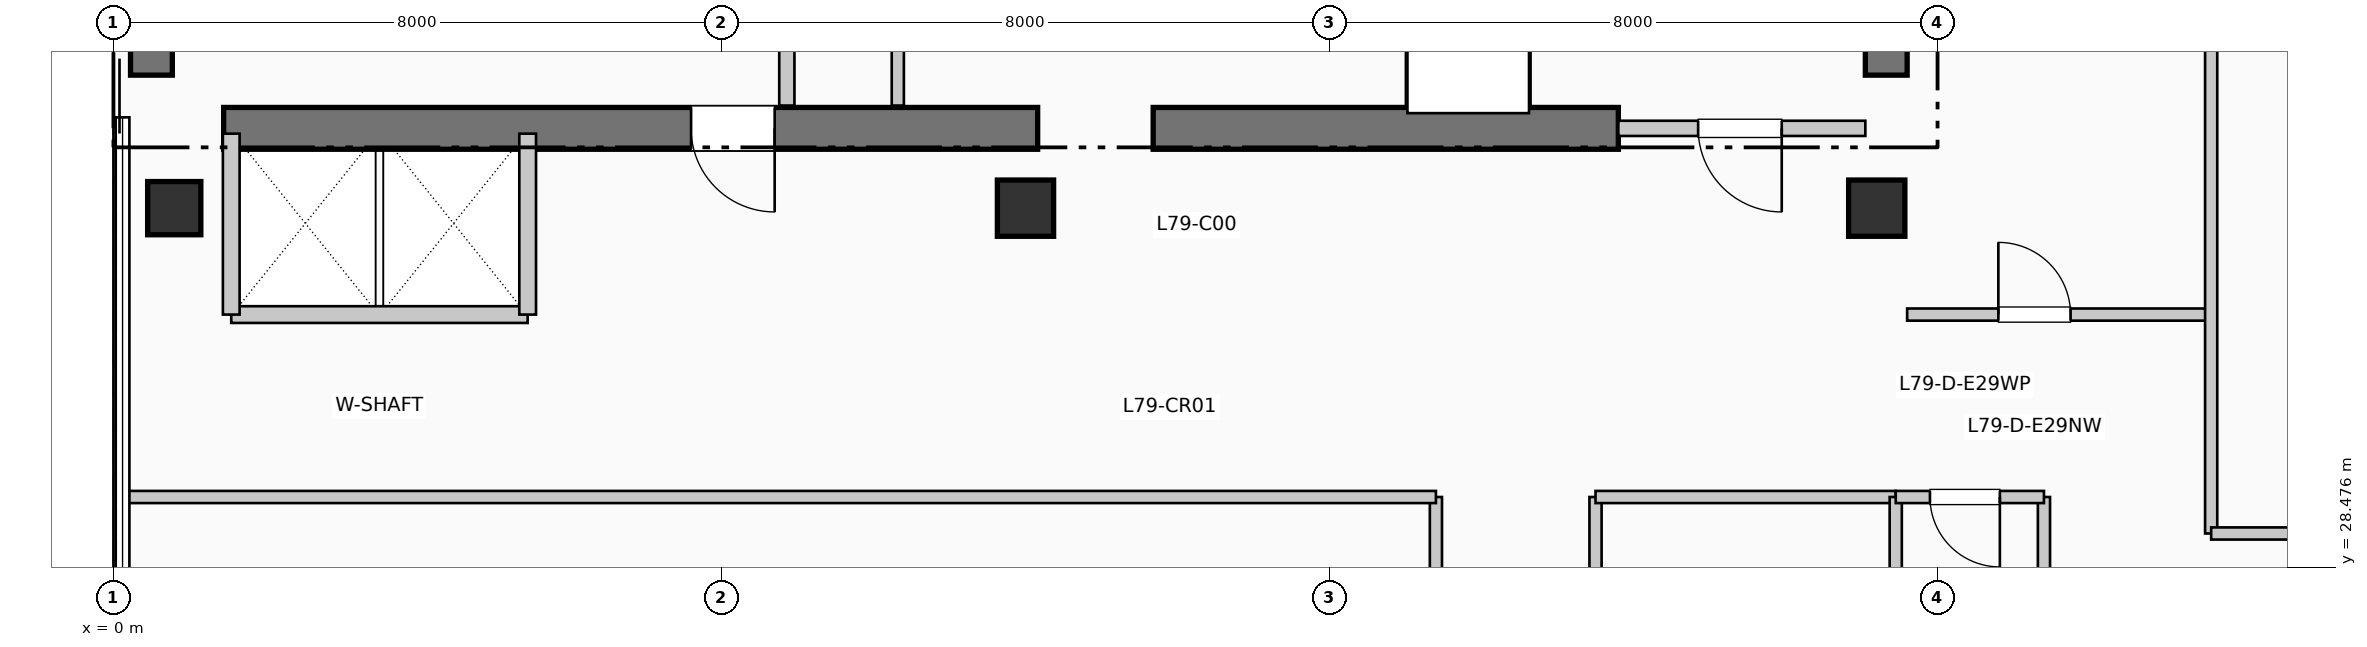
"""IFC4 building model, lengths in metres.
Left out: names, types, materials, properties, quantities, classifications, styles, units other than length and angle.
Written with IfcOpenShell. Run it as: python <this file> out.ifc"""

import sys

from ifc_helpers import new_model, si_unit, direction, frame, frame_2d, origin, origin_2d, place, context, subcontext, project, spatial, rectangle, extrude, element, fill, save


model = new_model("IFC4")
c1 = context("Model", 3, precision=1e-05, world=origin(), true_north=direction((0.0, 1.0)))
c2 = subcontext(c1, "Body", "Model", "MODEL_VIEW")
j1 = project(units=[si_unit("LENGTHUNIT", "METRE"), si_unit("PLANEANGLEUNIT", "RADIAN")], contexts=[c1])
p1 = place(None, origin())
s1 = spatial("IfcSite", under=j1, at=p1, CompositionType="ELEMENT")
p2 = place(p1, origin())
s2 = spatial("IfcBuilding", under=s1, at=p2, CompositionType="ELEMENT")
p3 = place(p2, frame((0.0, 0.0, 323.73)))
s3 = spatial("IfcBuildingStorey", under=s2, at=p3, CompositionType="ELEMENT", Elevation=323.73)
p4 = place(p3, frame((0.5, 34.95, 0.0), z_axis=(0.0, 0.0, 1.0), x_axis=(0.0, 1.0, 0.0)))
e1 = element("IfcWall", 1, at=p4, inside=s3, PredefinedType="SHEAR", context=c2, shape_type="SweptSolid", body=[
    extrude(rectangle(XDim=7.9, YDim=0.55, at=frame_2d((3.95, 0.0))), origin(), (0.0, 0.0, 1.0), 3.96),
])
p5 = place(p3, frame((23.325, 34.95, 0.0), z_axis=(0.0, 0.0, 1.0), x_axis=(0.0, 1.0, 0.0)))
e2 = element("IfcWall", 2, at=p5, inside=s3, PredefinedType="SHEAR", context=c2, shape_type="SweptSolid", body=[
    extrude(rectangle(XDim=10.64, YDim=0.55, at=frame_2d((5.32, 0.0))), origin(), (0.0, 0.0, 1.0), 3.96),
])
p6 = place(p3, frame((1.45, 34.25, 0.0), z_axis=(0.0, 0.0, 1.0), x_axis=(1.0, 0.0, 0.0)))
e3 = element("IfcWall", 3, at=p6, inside=s3, PredefinedType="SHEAR", context=c2, shape_type="SweptSolid", body=[
    extrude(rectangle(XDim=10.71, YDim=0.55, at=frame_2d((5.355, 0.0))), origin(), (0.0, 0.0, 1.0), 3.96),
])
p7 = place(p6, frame((7.25, 0.0, 0.0), z_axis=(0.0, 0.0, 1.0), x_axis=(-1.0, 0.0, 0.0)))
e4 = element("IfcOpeningElement", 4, at=p7, cuts=e3, PredefinedType="OPENING", context=c2, shape_type="SweptSolid", body=[
    extrude(rectangle(XDim=1.1, YDim=2.15, at=frame_2d((0.55, 1.075))), frame((0.0, 0.285, 0.0), z_axis=(0.0, -1.0, 0.0), x_axis=(1.0, 0.0, 0.0)), (0.0, 0.0, 1.0), 0.57),
])
p8 = place(p3, frame((13.68, 34.25, 0.0), z_axis=(0.0, 0.0, 1.0), x_axis=(1.0, 0.0, 0.0)))
e5 = element("IfcWall", 5, at=p8, inside=s3, PredefinedType="SHEAR", context=c2, shape_type="SweptSolid", body=[
    extrude(rectangle(XDim=6.12, YDim=0.55, at=frame_2d((3.06, 0.0))), origin(), (0.0, 0.0, 1.0), 3.96),
])
p9 = place(p3, frame((0.8, 33.2, 0.0), z_axis=(0.0, 0.0, 1.0), x_axis=(1.0, 0.0, 0.0)))
e6 = element("IfcColumn", 6, at=p9, inside=s3, PredefinedType="COLUMN", context=c2, shape_type="SweptSolid", body=[
    extrude(rectangle(XDim=0.7, YDim=0.7, at=origin_2d()), origin(), (0.0, 0.0, 1.0), 3.96),
])
for number, where, z_axis, x_axis in (
    (7, (12.0, 33.2, 0.0), (0.0, 0.0, 1.0), (1.0, 0.0, 0.0)),
    (8, (23.2, 33.2, 0.0), (0.0, 0.0, 1.0), (1.0, 0.0, 0.0)),
):
    element("IfcColumn", number, at=place(p3, frame(where, z_axis=z_axis, x_axis=x_axis)), inside=s3, PredefinedType="COLUMN", context=c2, shape_type="SweptSolid", body=[
        extrude(rectangle(XDim=0.74, YDim=0.74, at=origin_2d()), origin(), (0.0, 0.0, 1.0), 3.96),
    ])
p10 = place(p3, frame((8.86, 34.55, 0.0), z_axis=(0.0, 0.0, 1.0), x_axis=(0.0, 1.0, 0.0)))
e9 = element("IfcWall", 9, at=p10, inside=s3, PredefinedType="PARTITIONING", context=c2, shape_type="SweptSolid", body=[
    extrude(rectangle(XDim=2.5, YDim=0.2, at=frame_2d((1.25, 0.0))), origin(), (0.0, 0.0, 1.0), 3.74),
])
p11 = place(p3, frame((19.8, 34.25, 0.0), z_axis=(0.0, 0.0, 1.0), x_axis=(1.0, 0.0, 0.0)))
e10 = element("IfcWall", 10, at=p11, inside=s3, PredefinedType="PARTITIONING", context=c2, shape_type="SweptSolid", body=[
    extrude(rectangle(XDim=3.25, YDim=0.2, at=frame_2d((1.625, 0.0))), origin(), (0.0, 0.0, 1.0), 3.74),
])
p12 = place(p11, frame((2.15, 0.0, 0.0), z_axis=(0.0, 0.0, 1.0), x_axis=(-1.0, 0.0, 0.0)))
e11 = element("IfcOpeningElement", 11, at=p12, cuts=e10, PredefinedType="OPENING", context=c2, shape_type="SweptSolid", body=[
    extrude(rectangle(XDim=1.1, YDim=2.15, at=frame_2d((0.55, 1.075))), frame((0.0, 0.11, 0.0), z_axis=(0.0, -1.0, 0.0), x_axis=(1.0, 0.0, 0.0)), (0.0, 0.0, 1.0), 0.22),
])
p13 = place(p3, frame((1.55, 31.8, 0.0), z_axis=(0.0, 0.0, 1.0), x_axis=(1.0, 0.0, 0.0)))
e12 = element("IfcWall", 12, at=p13, inside=s3, PredefinedType="PARTITIONING", context=c2, shape_type="SweptSolid", body=[
    extrude(rectangle(XDim=3.9, YDim=0.22, at=frame_2d((1.95, 0.0))), origin(), (0.0, 0.0, 1.0), 3.74),
])
for number, where, z_axis, x_axis in (
    (13, (1.55, 31.8, 0.0), (0.0, 0.0, 1.0), (0.0, 1.0, 0.0)),
    (14, (5.45, 31.8, 0.0), (0.0, 0.0, 1.0), (0.0, 1.0, 0.0)),
):
    element("IfcWall", number, at=place(p3, frame(where, z_axis=z_axis, x_axis=x_axis)), inside=s3, PredefinedType="PARTITIONING", context=c2, shape_type="SweptSolid", body=[
        extrude(rectangle(XDim=2.38, YDim=0.22, at=frame_2d((1.19, 0.0))), origin(), (0.0, 0.0, 1.0), 3.74),
    ])
p14 = place(p3, frame((10.32, 34.55, 0.0), z_axis=(0.0, 0.0, 1.0), x_axis=(0.0, 1.0, 0.0)))
e15 = element("IfcWall", 15, at=p14, inside=s3, PredefinedType="PARTITIONING", context=c2, shape_type="SweptSolid", body=[
    extrude(rectangle(XDim=2.15, YDim=0.16, at=frame_2d((1.075, 0.0))), origin(), (0.0, 0.0, 1.0), 3.74),
])
p15 = place(p3, frame((17.4, 21.0, 0.0), z_axis=(0.0, 0.0, 1.0), x_axis=(0.0, 1.0, 0.0)))
e16 = element("IfcWall", 16, at=p15, inside=s3, PredefinedType="PARTITIONING", context=c2, shape_type="SweptSolid", body=[
    extrude(rectangle(XDim=8.4, YDim=0.16, at=frame_2d((4.2, 0.0))), origin(), (0.0, 0.0, 1.0), 3.74),
])
p16 = place(p15, frame((1.903, 0.0, 0.0), z_axis=(0.0, 0.0, 1.0), x_axis=(-1.0, 0.0, 0.0)))
e17 = element("IfcOpeningElement", 17, at=p16, cuts=e16, PredefinedType="OPENING", context=c2, shape_type="SweptSolid", body=[
    extrude(rectangle(XDim=0.95, YDim=2.15, at=frame_2d((0.475, 1.075))), frame((0.0, 0.09, 0.0), z_axis=(0.0, -1.0, 0.0), x_axis=(1.0, 0.0, 0.0)), (0.0, 0.0, 1.0), 0.18),
])
p17 = place(p15, frame((6.103, 0.0, 0.0), z_axis=(0.0, 0.0, 1.0), x_axis=(-1.0, 0.0, 0.0)))
e18 = element("IfcOpeningElement", 18, at=p17, cuts=e16, PredefinedType="OPENING", context=c2, shape_type="SweptSolid", body=[
    extrude(rectangle(XDim=0.95, YDim=2.15, at=frame_2d((0.475, 1.075))), frame((0.0, 0.09, 0.0), z_axis=(0.0, -1.0, 0.0), x_axis=(1.0, 0.0, 0.0)), (0.0, 0.0, 1.0), 0.18),
])
p18 = place(p3, frame((19.5, 21.0, 0.0), z_axis=(0.0, 0.0, 1.0), x_axis=(0.0, 1.0, 0.0)))
e19 = element("IfcWall", 19, at=p18, inside=s3, PredefinedType="PARTITIONING", context=c2, shape_type="SweptSolid", body=[
    extrude(rectangle(XDim=8.4, YDim=0.16, at=frame_2d((4.2, 0.0))), origin(), (0.0, 0.0, 1.0), 3.74),
])
p19 = place(p18, frame((3.725, 0.0, 0.0)))
e20 = element("IfcOpeningElement", 20, at=p19, cuts=e19, PredefinedType="OPENING", context=c2, shape_type="SweptSolid", body=[
    extrude(rectangle(XDim=0.95, YDim=2.15, at=frame_2d((0.475, 1.075))), frame((0.0, 0.09, 0.0), z_axis=(0.0, -1.0, 0.0), x_axis=(1.0, 0.0, 0.0)), (0.0, 0.0, 1.0), 0.18),
])
p20 = place(p3, frame((0.19, 29.4, 0.0), z_axis=(0.0, 0.0, 1.0), x_axis=(1.0, 0.0, 0.0)))
e21 = element("IfcWall", 21, at=p20, inside=s3, PredefinedType="PARTITIONING", context=c2, shape_type="SweptSolid", body=[
    extrude(rectangle(XDim=17.21, YDim=0.16, at=frame_2d((8.605, 0.0))), origin(), (0.0, 0.0, 1.0), 3.425),
])
p21 = place(p3, frame((19.5, 29.4, 0.0), z_axis=(0.0, 0.0, 1.0), x_axis=(1.0, 0.0, 0.0)))
e22 = element("IfcWall", 22, at=p21, inside=s3, PredefinedType="PARTITIONING", context=c2, shape_type="SweptSolid", body=[
    extrude(rectangle(XDim=3.95, YDim=0.16, at=frame_2d((1.975, 0.0))), origin(), (0.0, 0.0, 1.0), 3.425),
])
p22 = place(p3, frame((23.45, 5.99, 0.0), z_axis=(0.0, 0.0, 1.0), x_axis=(0.0, 1.0, 0.0)))
e23 = element("IfcWall", 23, at=p22, inside=s3, PredefinedType="PARTITIONING", context=c2, shape_type="SweptSolid", body=[
    extrude(rectangle(XDim=23.41, YDim=0.16, at=frame_2d((11.705, 0.0))), origin(), (0.0, 0.0, 1.0), 3.175),
])
p23 = place(p3, frame((25.4, 25.19, 0.0), z_axis=(0.0, 0.0, 1.0), x_axis=(0.0, 1.0, 0.0)))
e24 = element("IfcWall", 24, at=p23, inside=s3, PredefinedType="PARTITIONING", context=c2, shape_type="SweptSolid", body=[
    extrude(rectangle(XDim=4.21, YDim=0.16, at=frame_2d((2.105, 0.0))), origin(), (0.0, 0.0, 1.0), 3.74),
])
p24 = place(p3, frame((23.6, 31.8, 0.0), z_axis=(0.0, 0.0, 1.0), x_axis=(1.0, 0.0, 0.0)))
e25 = element("IfcWall", 25, at=p24, inside=s3, PredefinedType="PARTITIONING", context=c2, shape_type="SweptSolid", body=[
    extrude(rectangle(XDim=4.0, YDim=0.16, at=frame_2d((2.0, 0.0))), origin(), (0.0, 0.0, 1.0), 3.74),
])
p25 = place(p24, frame((1.2, 0.0, 0.0)))
e26 = element("IfcOpeningElement", 26, at=p25, cuts=e25, PredefinedType="OPENING", context=c2, shape_type="SweptSolid", body=[
    extrude(rectangle(XDim=0.95, YDim=2.15, at=frame_2d((0.475, 1.075))), frame((0.0, 0.09, 0.0), z_axis=(0.0, -1.0, 0.0), x_axis=(1.0, 0.0, 0.0)), (0.0, 0.0, 1.0), 0.18),
])
p26 = place(p3, frame((27.6, 28.92, 0.0), z_axis=(0.0, 0.0, 1.0), x_axis=(0.0, 1.0, 0.0)))
e27 = element("IfcWall", 27, at=p26, inside=s3, PredefinedType="PARTITIONING", context=c2, shape_type="SweptSolid", body=[
    extrude(rectangle(XDim=16.89, YDim=0.16, at=frame_2d((8.445, 0.0))), origin(), (0.0, 0.0, 1.0), 3.74),
])
p27 = place(p3, frame((27.6, 28.92, 0.0), z_axis=(0.0, 0.0, 1.0), x_axis=(1.0, 0.0, 0.0)))
e28 = element("IfcWall", 28, at=p27, inside=s3, PredefinedType="PARTITIONING", context=c2, shape_type="SweptSolid", body=[
    extrude(rectangle(XDim=16.61, YDim=0.16, at=frame_2d((8.305, 0.0))), origin(), (0.0, 0.0, 1.0), 3.74),
])
p28 = place(p27, frame((2.5, 0.0, 0.0)))
e29 = element("IfcOpeningElement", 29, at=p28, cuts=e28, PredefinedType="OPENING", context=c2, shape_type="SweptSolid", body=[
    extrude(rectangle(XDim=0.95, YDim=2.15, at=frame_2d((0.475, 1.075))), frame((0.0, 0.09, 0.0), z_axis=(0.0, -1.0, 0.0), x_axis=(1.0, 0.0, 0.0)), (0.0, 0.0, 1.0), 0.18),
])
p29 = place(p27, frame((11.0, 0.0, 0.0)))
e30 = element("IfcOpeningElement", 30, at=p29, cuts=e28, PredefinedType="OPENING", context=c2, shape_type="SweptSolid", body=[
    extrude(rectangle(XDim=0.95, YDim=2.15, at=frame_2d((0.475, 1.075))), frame((0.0, 0.09, 0.0), z_axis=(0.0, -1.0, 0.0), x_axis=(1.0, 0.0, 0.0)), (0.0, 0.0, 1.0), 0.18),
])
p30 = place(p3, frame((23.45, 29.4, 0.0), z_axis=(0.0, 0.0, 1.0), x_axis=(1.0, 0.0, 0.0)))
e31 = element("IfcWall", 31, at=p30, inside=s3, PredefinedType="PARTITIONING", context=c2, shape_type="SweptSolid", body=[
    extrude(rectangle(XDim=1.95, YDim=0.16, at=frame_2d((0.975, 0.0))), origin(), (0.0, 0.0, 1.0), 3.425),
])
p31 = place(p30, frame((1.37, 0.0, 0.0), z_axis=(0.0, 0.0, 1.0), x_axis=(-1.0, 0.0, 0.0)))
e32 = element("IfcOpeningElement", 32, at=p31, cuts=e31, PredefinedType="OPENING", context=c2, shape_type="SweptSolid", body=[
    extrude(rectangle(XDim=0.92, YDim=2.1, at=frame_2d((0.46, 1.05))), frame((0.0, 0.09, 0.0), z_axis=(0.0, -1.0, 0.0), x_axis=(1.0, 0.0, 0.0)), (0.0, 0.0, 1.0), 0.18),
])
p32 = place(p7, origin())
e33 = element("IfcDoor", 33, at=p32, inside=s3, OperationType="SINGLE_SWING_RIGHT", PredefinedType="DOOR", context=c2, shape_type="SweptSolid", body=[
    extrude(rectangle(XDim=1.1, YDim=2.15, at=frame_2d((0.55, 1.075))), frame((0.0, 0.025, 0.0), z_axis=(0.0, -1.0, 0.0), x_axis=(1.0, 0.0, 0.0)), (0.0, 0.0, 1.0), 0.05),
])
fill(e4, e33)
p33 = place(p12, origin())
e34 = element("IfcDoor", 34, at=p33, inside=s3, OperationType="SINGLE_SWING_RIGHT", PredefinedType="DOOR", context=c2, shape_type="SweptSolid", body=[
    extrude(rectangle(XDim=1.1, YDim=2.15, at=frame_2d((0.55, 1.075))), frame((0.0, 0.025, 0.0), z_axis=(0.0, -1.0, 0.0), x_axis=(1.0, 0.0, 0.0)), (0.0, 0.0, 1.0), 0.05),
])
fill(e11, e34)
p34 = place(p25, origin())
e35 = element("IfcDoor", 35, at=p34, inside=s3, OperationType="SINGLE_SWING_LEFT", PredefinedType="DOOR", context=c2, shape_type="SweptSolid", body=[
    extrude(rectangle(XDim=0.95, YDim=2.15, at=frame_2d((0.475, 1.075))), frame((0.0, 0.025, 0.0), z_axis=(0.0, -1.0, 0.0), x_axis=(1.0, 0.0, 0.0)), (0.0, 0.0, 1.0), 0.05),
])
fill(e26, e35)
p35 = place(p31, origin())
e36 = element("IfcDoor", 36, at=p35, inside=s3, OperationType="SINGLE_SWING_RIGHT", PredefinedType="DOOR", context=c2, shape_type="SweptSolid", body=[
    extrude(rectangle(XDim=0.92, YDim=2.1, at=frame_2d((0.46, 1.05))), frame((0.0, 0.025, 0.0), z_axis=(0.0, -1.0, 0.0), x_axis=(1.0, 0.0, 0.0)), (0.0, 0.0, 1.0), 0.05),
])
fill(e32, e36)
save(model, sys.argv[1])
